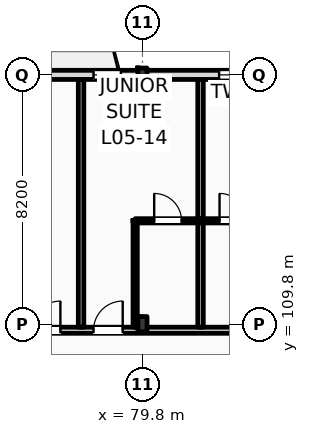
"""IFC4 building model, lengths in metres.
Left out: names, types, materials, properties, quantities, classifications, styles, units other than length and angle.
Written with IfcOpenShell. Run it as: python <this file> out.ifc"""

import sys

from ifc_helpers import new_model, si_unit, direction, frame, frame_2d, origin, origin_2d, place, context, subcontext, project, spatial, rectangle, i_section, extrude, element, fill, save


model = new_model("IFC4")
c1 = context("Model", 3, precision=1e-05, world=origin(), true_north=direction((0.0, 1.0)))
c2 = subcontext(c1, "Body", "Model", "MODEL_VIEW")
j1 = project(units=[si_unit("LENGTHUNIT", "METRE"), si_unit("PLANEANGLEUNIT", "RADIAN")], contexts=[c1])
p1 = place(None, origin())
s1 = spatial("IfcSite", under=j1, at=p1, CompositionType="ELEMENT")
p2 = place(p1, origin())
s2 = spatial("IfcBuilding", under=s1, at=p2, CompositionType="ELEMENT")
p3 = place(p2, frame((0.0, 0.0, 24.6)))
s3 = spatial("IfcBuildingStorey", under=s2, at=p3, CompositionType="ELEMENT", Elevation=24.6)
p4 = place(p3, frame((79.8, 109.8, 0.0), z_axis=(0.0, 0.0, 1.0), x_axis=(1.0, 0.0, 0.0)))
e1 = element("IfcColumn", 1, at=p4, inside=s3, PredefinedType="COLUMN", context=c2, shape_type="SweptSolid", body=[
    extrude(i_section(OverallWidth=0.3, OverallDepth=0.5, WebThickness=0.014, FlangeThickness=0.028, FilletRadius=0.027, at=origin_2d()), origin(), (0.0, 0.0, 1.0), 3.6),
])
p5 = place(p3, frame((79.8, 118.0, 0.0), z_axis=(0.0, 0.0, 1.0), x_axis=(1.0, 0.0, 0.0)))
e2 = element("IfcColumn", 2, at=p5, inside=s3, PredefinedType="COLUMN", context=c2, shape_type="SweptSolid", body=[
    extrude(i_section(OverallWidth=0.3, OverallDepth=0.45, WebThickness=0.014, FlangeThickness=0.026, FilletRadius=0.027, at=origin_2d()), origin(), (0.0, 0.0, 1.0), 3.6),
])
p6 = place(p3, frame((22.5, 118.0, 0.0), z_axis=(0.0, 0.0, 1.0), x_axis=(1.0, 0.0, 0.0)))
e3 = element("IfcWall", 3, at=p6, inside=s3, PredefinedType="STANDARD", context=c2, shape_type="SweptSolid", body=[
    extrude(rectangle(XDim=97.5, YDim=0.3, at=frame_2d((48.75, 0.0))), origin(), (0.0, 0.0, 1.0), 2.78),
])
p7 = place(p6, frame((0.91, 0.0, 0.9)))
e4 = element("IfcOpeningElement", 4, at=p7, cuts=e3, PredefinedType="OPENING", context=c2, shape_type="SweptSolid", body=[
    extrude(rectangle(XDim=0.9, YDim=1.7, at=frame_2d((0.45, 0.85))), frame((0.0, 0.16, 0.0), z_axis=(0.0, -1.0, 0.0), x_axis=(1.0, 0.0, 0.0)), (0.0, 0.0, 1.0), 0.32),
])
p8 = place(p6, frame((6.275, 0.0, 0.0)))
e5 = element("IfcOpeningElement", 5, at=p8, cuts=e3, PredefinedType="OPENING", context=c2, shape_type="SweptSolid", body=[
    extrude(rectangle(XDim=1.2, YDim=2.25, at=frame_2d((0.6, 1.125))), frame((0.0, 0.16, 0.0), z_axis=(0.0, -1.0, 0.0), x_axis=(1.0, 0.0, 0.0)), (0.0, 0.0, 1.0), 0.32),
])
p9 = place(p6, frame((11.42, 0.0, 0.9)))
e6 = element("IfcOpeningElement", 6, at=p9, cuts=e3, PredefinedType="OPENING", context=c2, shape_type="SweptSolid", body=[
    extrude(rectangle(XDim=1.35, YDim=1.7, at=frame_2d((0.675, 0.85))), frame((0.0, 0.16, 0.0), z_axis=(0.0, -1.0, 0.0), x_axis=(1.0, 0.0, 0.0)), (0.0, 0.0, 1.0), 0.32),
])
p10 = place(p6, frame((14.345, 0.0, 0.9)))
e7 = element("IfcOpeningElement", 7, at=p10, cuts=e3, PredefinedType="OPENING", context=c2, shape_type="SweptSolid", body=[
    extrude(rectangle(XDim=1.8, YDim=1.7, at=frame_2d((0.9, 0.85))), frame((0.0, 0.16, 0.0), z_axis=(0.0, -1.0, 0.0), x_axis=(1.0, 0.0, 0.0)), (0.0, 0.0, 1.0), 0.32),
])
p11 = place(p6, frame((19.27, 0.0, 0.9)))
e8 = element("IfcOpeningElement", 8, at=p11, cuts=e3, PredefinedType="OPENING", context=c2, shape_type="SweptSolid", body=[
    extrude(rectangle(XDim=1.95, YDim=1.7, at=frame_2d((0.975, 0.85))), frame((0.0, 0.16, 0.0), z_axis=(0.0, -1.0, 0.0), x_axis=(1.0, 0.0, 0.0)), (0.0, 0.0, 1.0), 0.32),
])
p12 = place(p6, frame((22.97, 0.0, 0.0)))
e9 = element("IfcOpeningElement", 9, at=p12, cuts=e3, PredefinedType="OPENING", context=c2, shape_type="SweptSolid", body=[
    extrude(rectangle(XDim=1.2, YDim=2.25, at=frame_2d((0.6, 1.125))), frame((0.0, 0.16, 0.0), z_axis=(0.0, -1.0, 0.0), x_axis=(1.0, 0.0, 0.0)), (0.0, 0.0, 1.0), 0.32),
])
p13 = place(p6, frame((26.92, 0.0, 0.9)))
e10 = element("IfcOpeningElement", 10, at=p13, cuts=e3, PredefinedType="OPENING", context=c2, shape_type="SweptSolid", body=[
    extrude(rectangle(XDim=2.25, YDim=1.7, at=frame_2d((1.125, 0.85))), frame((0.0, 0.16, 0.0), z_axis=(0.0, -1.0, 0.0), x_axis=(1.0, 0.0, 0.0)), (0.0, 0.0, 1.0), 0.32),
])
p14 = place(p6, frame((30.645, 0.0, 0.9)))
e11 = element("IfcOpeningElement", 11, at=p14, cuts=e3, PredefinedType="OPENING", context=c2, shape_type="SweptSolid", body=[
    extrude(rectangle(XDim=2.4, YDim=1.7, at=frame_2d((1.2, 0.85))), frame((0.0, 0.16, 0.0), z_axis=(0.0, -1.0, 0.0), x_axis=(1.0, 0.0, 0.0)), (0.0, 0.0, 1.0), 0.32),
])
p15 = place(p6, frame((36.71, 0.0, 0.0)))
e12 = element("IfcOpeningElement", 12, at=p15, cuts=e3, PredefinedType="OPENING", context=c2, shape_type="SweptSolid", body=[
    extrude(rectangle(XDim=1.2, YDim=2.25, at=frame_2d((0.6, 1.125))), frame((0.0, 0.16, 0.0), z_axis=(0.0, -1.0, 0.0), x_axis=(1.0, 0.0, 0.0)), (0.0, 0.0, 1.0), 0.32),
])
p16 = place(p6, frame((39.17, 0.0, 0.0)))
e13 = element("IfcOpeningElement", 13, at=p16, cuts=e3, PredefinedType="OPENING", context=c2, shape_type="SweptSolid", body=[
    extrude(rectangle(XDim=1.2, YDim=2.25, at=frame_2d((0.6, 1.125))), frame((0.0, 0.16, 0.0), z_axis=(0.0, -1.0, 0.0), x_axis=(1.0, 0.0, 0.0)), (0.0, 0.0, 1.0), 0.32),
])
p17 = place(p6, frame((43.22, 0.0, 0.9)))
e14 = element("IfcOpeningElement", 14, at=p17, cuts=e3, PredefinedType="OPENING", context=c2, shape_type="SweptSolid", body=[
    extrude(rectangle(XDim=2.85, YDim=1.7, at=frame_2d((1.425, 0.85))), frame((0.0, 0.16, 0.0), z_axis=(0.0, -1.0, 0.0), x_axis=(1.0, 0.0, 0.0)), (0.0, 0.0, 1.0), 0.32),
])
p18 = place(p6, frame((47.29, 0.0, 0.9)))
e15 = element("IfcOpeningElement", 15, at=p18, cuts=e3, PredefinedType="OPENING", context=c2, shape_type="SweptSolid", body=[
    extrude(rectangle(XDim=1.35, YDim=1.7, at=frame_2d((0.675, 0.85))), frame((0.0, 0.16, 0.0), z_axis=(0.0, -1.0, 0.0), x_axis=(1.0, 0.0, 0.0)), (0.0, 0.0, 1.0), 0.32),
])
p19 = place(p6, frame((52.91, 0.0, 0.0)))
e16 = element("IfcOpeningElement", 16, at=p19, cuts=e3, PredefinedType="OPENING", context=c2, shape_type="SweptSolid", body=[
    extrude(rectangle(XDim=1.2, YDim=2.25, at=frame_2d((0.6, 1.125))), frame((0.0, 0.16, 0.0), z_axis=(0.0, -1.0, 0.0), x_axis=(1.0, 0.0, 0.0)), (0.0, 0.0, 1.0), 0.32),
])
p20 = place(p6, frame((55.69, 0.0, 0.9)))
e17 = element("IfcOpeningElement", 17, at=p20, cuts=e3, PredefinedType="OPENING", context=c2, shape_type="SweptSolid", body=[
    extrude(rectangle(XDim=0.9, YDim=1.7, at=frame_2d((0.45, 0.85))), frame((0.0, 0.16, 0.0), z_axis=(0.0, -1.0, 0.0), x_axis=(1.0, 0.0, 0.0)), (0.0, 0.0, 1.0), 0.32),
])
p21 = place(p6, frame((59.82, 0.0, 0.9)))
e18 = element("IfcOpeningElement", 18, at=p21, cuts=e3, PredefinedType="OPENING", context=c2, shape_type="SweptSolid", body=[
    extrude(rectangle(XDim=3.25, YDim=1.7, at=frame_2d((1.625, 0.85))), frame((0.0, 0.16, 0.0), z_axis=(0.0, -1.0, 0.0), x_axis=(1.0, 0.0, 0.0)), (0.0, 0.0, 1.0), 0.32),
])
p22 = place(p6, frame((65.89, 0.0, 0.9)))
e19 = element("IfcOpeningElement", 19, at=p22, cuts=e3, PredefinedType="OPENING", context=c2, shape_type="SweptSolid", body=[
    extrude(rectangle(XDim=1.1, YDim=1.7, at=frame_2d((0.55, 0.85))), frame((0.0, 0.16, 0.0), z_axis=(0.0, -1.0, 0.0), x_axis=(1.0, 0.0, 0.0)), (0.0, 0.0, 1.0), 0.32),
])
p23 = place(p6, frame((69.245, 0.0, 0.0)))
e20 = element("IfcOpeningElement", 20, at=p23, cuts=e3, PredefinedType="OPENING", context=c2, shape_type="SweptSolid", body=[
    extrude(rectangle(XDim=1.2, YDim=2.25, at=frame_2d((0.6, 1.125))), frame((0.0, 0.16, 0.0), z_axis=(0.0, -1.0, 0.0), x_axis=(1.0, 0.0, 0.0)), (0.0, 0.0, 1.0), 0.32),
])
p24 = place(p6, frame((73.69, 0.0, 0.9)))
e21 = element("IfcOpeningElement", 21, at=p24, cuts=e3, PredefinedType="OPENING", context=c2, shape_type="SweptSolid", body=[
    extrude(rectangle(XDim=1.8, YDim=1.7, at=frame_2d((0.9, 0.85))), frame((0.0, 0.16, 0.0), z_axis=(0.0, -1.0, 0.0), x_axis=(1.0, 0.0, 0.0)), (0.0, 0.0, 1.0), 0.32),
])
p25 = place(p6, frame((76.62, 0.0, 0.9)))
e22 = element("IfcOpeningElement", 22, at=p25, cuts=e3, PredefinedType="OPENING", context=c2, shape_type="SweptSolid", body=[
    extrude(rectangle(XDim=3.25, YDim=1.7, at=frame_2d((1.625, 0.85))), frame((0.0, 0.16, 0.0), z_axis=(0.0, -1.0, 0.0), x_axis=(1.0, 0.0, 0.0)), (0.0, 0.0, 1.0), 0.32),
])
p26 = place(p6, frame((81.895, 0.0, 0.9)))
e23 = element("IfcOpeningElement", 23, at=p26, cuts=e3, PredefinedType="OPENING", context=c2, shape_type="SweptSolid", body=[
    extrude(rectangle(XDim=1.1, YDim=1.5, at=frame_2d((0.55, 0.75))), frame((0.0, 0.16, 0.0), z_axis=(0.0, -1.0, 0.0), x_axis=(1.0, 0.0, 0.0)), (0.0, 0.0, 1.0), 0.32),
])
p27 = place(p6, frame((86.02, 0.0, 0.9)))
e24 = element("IfcOpeningElement", 24, at=p27, cuts=e3, PredefinedType="OPENING", context=c2, shape_type="SweptSolid", body=[
    extrude(rectangle(XDim=1.25, YDim=1.6, at=frame_2d((0.625, 0.8))), frame((0.0, 0.16, 0.0), z_axis=(0.0, -1.0, 0.0), x_axis=(1.0, 0.0, 0.0)), (0.0, 0.0, 1.0), 0.32),
])
p28 = place(p6, frame((90.145, 0.0, 0.9)))
e25 = element("IfcOpeningElement", 25, at=p28, cuts=e3, PredefinedType="OPENING", context=c2, shape_type="SweptSolid", body=[
    extrude(rectangle(XDim=1.4, YDim=1.7, at=frame_2d((0.7, 0.85))), frame((0.0, 0.16, 0.0), z_axis=(0.0, -1.0, 0.0), x_axis=(1.0, 0.0, 0.0)), (0.0, 0.0, 1.0), 0.32),
])
p29 = place(p6, frame((94.155, 0.0, 0.9)))
e26 = element("IfcOpeningElement", 26, at=p29, cuts=e3, PredefinedType="OPENING", context=c2, shape_type="SweptSolid", body=[
    extrude(rectangle(XDim=1.6, YDim=1.7, at=frame_2d((0.8, 0.85))), frame((0.0, 0.16, 0.0), z_axis=(0.0, -1.0, 0.0), x_axis=(1.0, 0.0, 0.0)), (0.0, 0.0, 1.0), 0.32),
])
p30 = place(p3, frame((10.65, 109.6, 0.0), z_axis=(0.0, 0.0, 1.0), x_axis=(1.0, 0.0, 0.0)))
e27 = element("IfcWall", 27, at=p30, inside=s3, PredefinedType="PARTITIONING", context=c2, shape_type="SweptSolid", body=[
    extrude(rectangle(XDim=109.21, YDim=0.2, at=frame_2d((54.605, 0.0))), origin(), (0.0, 0.0, 1.0), 2.78),
])
p31 = place(p30, frame((12.705, 0.0, 0.0)))
e28 = element("IfcOpeningElement", 28, at=p31, cuts=e27, PredefinedType="OPENING", context=c2, shape_type="SweptSolid", body=[
    extrude(rectangle(XDim=1.02, YDim=2.2, at=frame_2d((0.51, 1.1))), frame((0.0, 0.11, 0.0), z_axis=(0.0, -1.0, 0.0), x_axis=(1.0, 0.0, 0.0)), (0.0, 0.0, 1.0), 0.22),
])
p32 = place(p30, frame((19.26, 0.0, 0.0)))
e29 = element("IfcOpeningElement", 29, at=p32, cuts=e27, PredefinedType="OPENING", context=c2, shape_type="SweptSolid", body=[
    extrude(rectangle(XDim=1.02, YDim=2.2, at=frame_2d((0.51, 1.1))), frame((0.0, 0.11, 0.0), z_axis=(0.0, -1.0, 0.0), x_axis=(1.0, 0.0, 0.0)), (0.0, 0.0, 1.0), 0.22),
])
p33 = place(p30, frame((23.71, 0.0, 0.0)))
e30 = element("IfcOpeningElement", 30, at=p33, cuts=e27, PredefinedType="OPENING", context=c2, shape_type="SweptSolid", body=[
    extrude(rectangle(XDim=1.02, YDim=2.2, at=frame_2d((0.51, 1.1))), frame((0.0, 0.11, 0.0), z_axis=(0.0, -1.0, 0.0), x_axis=(1.0, 0.0, 0.0)), (0.0, 0.0, 1.0), 0.22),
])
p34 = place(p30, frame((27.66, 0.0, 0.0)))
e31 = element("IfcOpeningElement", 31, at=p34, cuts=e27, PredefinedType="OPENING", context=c2, shape_type="SweptSolid", body=[
    extrude(rectangle(XDim=1.02, YDim=2.2, at=frame_2d((0.51, 1.1))), frame((0.0, 0.11, 0.0), z_axis=(0.0, -1.0, 0.0), x_axis=(1.0, 0.0, 0.0)), (0.0, 0.0, 1.0), 0.22),
])
p35 = place(p30, frame((31.89, 0.0, 0.0)))
e32 = element("IfcOpeningElement", 32, at=p35, cuts=e27, PredefinedType="OPENING", context=c2, shape_type="SweptSolid", body=[
    extrude(rectangle(XDim=0.96, YDim=2.2, at=frame_2d((0.48, 1.1))), frame((0.0, 0.11, 0.0), z_axis=(0.0, -1.0, 0.0), x_axis=(1.0, 0.0, 0.0)), (0.0, 0.0, 1.0), 0.22),
])
p36 = place(p30, frame((33.94, 0.0, 0.0)))
e33 = element("IfcOpeningElement", 33, at=p36, cuts=e27, PredefinedType="OPENING", context=c2, shape_type="SweptSolid", body=[
    extrude(rectangle(XDim=0.96, YDim=2.2, at=frame_2d((0.48, 1.1))), frame((0.0, 0.11, 0.0), z_axis=(0.0, -1.0, 0.0), x_axis=(1.0, 0.0, 0.0)), (0.0, 0.0, 1.0), 0.22),
])
p37 = place(p30, frame((40.29, 0.0, 0.0)))
e34 = element("IfcOpeningElement", 34, at=p37, cuts=e27, PredefinedType="OPENING", context=c2, shape_type="SweptSolid", body=[
    extrude(rectangle(XDim=0.96, YDim=2.2, at=frame_2d((0.48, 1.1))), frame((0.0, 0.11, 0.0), z_axis=(0.0, -1.0, 0.0), x_axis=(1.0, 0.0, 0.0)), (0.0, 0.0, 1.0), 0.22),
])
p38 = place(p30, frame((42.34, 0.0, 0.0)))
e35 = element("IfcOpeningElement", 35, at=p38, cuts=e27, PredefinedType="OPENING", context=c2, shape_type="SweptSolid", body=[
    extrude(rectangle(XDim=0.96, YDim=2.2, at=frame_2d((0.48, 1.1))), frame((0.0, 0.11, 0.0), z_axis=(0.0, -1.0, 0.0), x_axis=(1.0, 0.0, 0.0)), (0.0, 0.0, 1.0), 0.22),
])
p39 = place(p30, frame((48.69, 0.0, 0.0)))
e36 = element("IfcOpeningElement", 36, at=p39, cuts=e27, PredefinedType="OPENING", context=c2, shape_type="SweptSolid", body=[
    extrude(rectangle(XDim=0.96, YDim=2.2, at=frame_2d((0.48, 1.1))), frame((0.0, 0.11, 0.0), z_axis=(0.0, -1.0, 0.0), x_axis=(1.0, 0.0, 0.0)), (0.0, 0.0, 1.0), 0.22),
])
p40 = place(p30, frame((50.74, 0.0, 0.0)))
e37 = element("IfcOpeningElement", 37, at=p40, cuts=e27, PredefinedType="OPENING", context=c2, shape_type="SweptSolid", body=[
    extrude(rectangle(XDim=0.96, YDim=2.2, at=frame_2d((0.48, 1.1))), frame((0.0, 0.11, 0.0), z_axis=(0.0, -1.0, 0.0), x_axis=(1.0, 0.0, 0.0)), (0.0, 0.0, 1.0), 0.22),
])
p41 = place(p30, frame((57.09, 0.0, 0.0)))
e38 = element("IfcOpeningElement", 38, at=p41, cuts=e27, PredefinedType="OPENING", context=c2, shape_type="SweptSolid", body=[
    extrude(rectangle(XDim=0.96, YDim=2.2, at=frame_2d((0.48, 1.1))), frame((0.0, 0.11, 0.0), z_axis=(0.0, -1.0, 0.0), x_axis=(1.0, 0.0, 0.0)), (0.0, 0.0, 1.0), 0.22),
])
p42 = place(p30, frame((59.14, 0.0, 0.0)))
e39 = element("IfcOpeningElement", 39, at=p42, cuts=e27, PredefinedType="OPENING", context=c2, shape_type="SweptSolid", body=[
    extrude(rectangle(XDim=0.96, YDim=2.2, at=frame_2d((0.48, 1.1))), frame((0.0, 0.11, 0.0), z_axis=(0.0, -1.0, 0.0), x_axis=(1.0, 0.0, 0.0)), (0.0, 0.0, 1.0), 0.22),
])
p43 = place(p30, frame((65.49, 0.0, 0.0)))
e40 = element("IfcOpeningElement", 40, at=p43, cuts=e27, PredefinedType="OPENING", context=c2, shape_type="SweptSolid", body=[
    extrude(rectangle(XDim=0.96, YDim=2.2, at=frame_2d((0.48, 1.1))), frame((0.0, 0.11, 0.0), z_axis=(0.0, -1.0, 0.0), x_axis=(1.0, 0.0, 0.0)), (0.0, 0.0, 1.0), 0.22),
])
p44 = place(p30, frame((67.54, 0.0, 0.0)))
e41 = element("IfcOpeningElement", 41, at=p44, cuts=e27, PredefinedType="OPENING", context=c2, shape_type="SweptSolid", body=[
    extrude(rectangle(XDim=0.96, YDim=2.2, at=frame_2d((0.48, 1.1))), frame((0.0, 0.11, 0.0), z_axis=(0.0, -1.0, 0.0), x_axis=(1.0, 0.0, 0.0)), (0.0, 0.0, 1.0), 0.22),
])
p45 = place(p30, frame((73.89, 0.0, 0.0)))
e42 = element("IfcOpeningElement", 42, at=p45, cuts=e27, PredefinedType="OPENING", context=c2, shape_type="SweptSolid", body=[
    extrude(rectangle(XDim=0.96, YDim=2.2, at=frame_2d((0.48, 1.1))), frame((0.0, 0.11, 0.0), z_axis=(0.0, -1.0, 0.0), x_axis=(1.0, 0.0, 0.0)), (0.0, 0.0, 1.0), 0.22),
])
p46 = place(p30, frame((78.09, 0.0, 0.0)))
e43 = element("IfcOpeningElement", 43, at=p46, cuts=e27, PredefinedType="OPENING", context=c2, shape_type="SweptSolid", body=[
    extrude(rectangle(XDim=0.96, YDim=2.2, at=frame_2d((0.48, 1.1))), frame((0.0, 0.11, 0.0), z_axis=(0.0, -1.0, 0.0), x_axis=(1.0, 0.0, 0.0)), (0.0, 0.0, 1.0), 0.22),
])
p47 = place(p30, frame((82.29, 0.0, 0.0)))
e44 = element("IfcOpeningElement", 44, at=p47, cuts=e27, PredefinedType="OPENING", context=c2, shape_type="SweptSolid", body=[
    extrude(rectangle(XDim=0.96, YDim=2.2, at=frame_2d((0.48, 1.1))), frame((0.0, 0.11, 0.0), z_axis=(0.0, -1.0, 0.0), x_axis=(1.0, 0.0, 0.0)), (0.0, 0.0, 1.0), 0.22),
])
p48 = place(p30, frame((86.49, 0.0, 0.0)))
e45 = element("IfcOpeningElement", 45, at=p48, cuts=e27, PredefinedType="OPENING", context=c2, shape_type="SweptSolid", body=[
    extrude(rectangle(XDim=0.96, YDim=2.2, at=frame_2d((0.48, 1.1))), frame((0.0, 0.11, 0.0), z_axis=(0.0, -1.0, 0.0), x_axis=(1.0, 0.0, 0.0)), (0.0, 0.0, 1.0), 0.22),
])
p49 = place(p30, frame((88.54, 0.0, 0.0)))
e46 = element("IfcOpeningElement", 46, at=p49, cuts=e27, PredefinedType="OPENING", context=c2, shape_type="SweptSolid", body=[
    extrude(rectangle(XDim=0.96, YDim=2.2, at=frame_2d((0.48, 1.1))), frame((0.0, 0.11, 0.0), z_axis=(0.0, -1.0, 0.0), x_axis=(1.0, 0.0, 0.0)), (0.0, 0.0, 1.0), 0.22),
])
p50 = place(p30, frame((94.89, 0.0, 0.0)))
e47 = element("IfcOpeningElement", 47, at=p50, cuts=e27, PredefinedType="OPENING", context=c2, shape_type="SweptSolid", body=[
    extrude(rectangle(XDim=0.96, YDim=2.2, at=frame_2d((0.48, 1.1))), frame((0.0, 0.11, 0.0), z_axis=(0.0, -1.0, 0.0), x_axis=(1.0, 0.0, 0.0)), (0.0, 0.0, 1.0), 0.22),
])
p51 = place(p30, frame((96.94, 0.0, 0.0)))
e48 = element("IfcOpeningElement", 48, at=p51, cuts=e27, PredefinedType="OPENING", context=c2, shape_type="SweptSolid", body=[
    extrude(rectangle(XDim=0.96, YDim=2.2, at=frame_2d((0.48, 1.1))), frame((0.0, 0.11, 0.0), z_axis=(0.0, -1.0, 0.0), x_axis=(1.0, 0.0, 0.0)), (0.0, 0.0, 1.0), 0.22),
])
p52 = place(p30, frame((103.29, 0.0, 0.0)))
e49 = element("IfcOpeningElement", 49, at=p52, cuts=e27, PredefinedType="OPENING", context=c2, shape_type="SweptSolid", body=[
    extrude(rectangle(XDim=0.96, YDim=2.2, at=frame_2d((0.48, 1.1))), frame((0.0, 0.11, 0.0), z_axis=(0.0, -1.0, 0.0), x_axis=(1.0, 0.0, 0.0)), (0.0, 0.0, 1.0), 0.22),
])
p53 = place(p30, frame((105.25, 0.0, 0.0)))
e50 = element("IfcOpeningElement", 50, at=p53, cuts=e27, PredefinedType="OPENING", context=c2, shape_type="SweptSolid", body=[
    extrude(rectangle(XDim=0.96, YDim=2.2, at=frame_2d((0.48, 1.1))), frame((0.0, 0.11, 0.0), z_axis=(0.0, -1.0, 0.0), x_axis=(1.0, 0.0, 0.0)), (0.0, 0.0, 1.0), 0.22),
])
p54 = place(p30, frame((2.716, 0.0, 0.0)))
e51 = element("IfcOpeningElement", 51, at=p54, cuts=e27, PredefinedType="OPENING", context=c2, shape_type="SweptSolid", body=[
    extrude(rectangle(XDim=1.35, YDim=2.25, at=frame_2d((0.675, 1.125))), frame((0.0, 0.11, 0.0), z_axis=(0.0, -1.0, 0.0), x_axis=(1.0, 0.0, 0.0)), (0.0, 0.0, 1.0), 0.22),
])
p55 = place(p30, frame((6.65, 0.0, 0.0)))
e52 = element("IfcOpeningElement", 52, at=p55, cuts=e27, PredefinedType="OPENING", context=c2, shape_type="SweptSolid", body=[
    extrude(rectangle(XDim=1.35, YDim=2.25, at=frame_2d((0.675, 1.125))), frame((0.0, 0.11, 0.0), z_axis=(0.0, -1.0, 0.0), x_axis=(1.0, 0.0, 0.0)), (0.0, 0.0, 1.0), 0.22),
])
p56 = place(p30, frame((10.583, 0.0, 0.0)))
e53 = element("IfcOpeningElement", 53, at=p56, cuts=e27, PredefinedType="OPENING", context=c2, shape_type="SweptSolid", body=[
    extrude(rectangle(XDim=1.35, YDim=2.25, at=frame_2d((0.675, 1.125))), frame((0.0, 0.11, 0.0), z_axis=(0.0, -1.0, 0.0), x_axis=(1.0, 0.0, 0.0)), (0.0, 0.0, 1.0), 0.22),
])
for number, where, z_axis, x_axis in (
    (54, (77.78, 109.7, 0.0), (0.0, 0.0, 1.0), (0.0, 1.0, 0.0)),
    (55, (81.71, 109.7, 0.0), (0.0, 0.0, 1.0), (0.0, 1.0, 0.0)),
):
    element("IfcWall", number, at=place(p3, frame(where, z_axis=z_axis, x_axis=x_axis)), inside=s3, PredefinedType="PARTITIONING", context=c2, shape_type="SweptSolid", body=[
        extrude(rectangle(XDim=8.15, YDim=0.18, at=frame_2d((4.075, 0.0))), origin(), (0.0, 0.0, 1.0), 3.34),
    ])
p57 = place(p3, frame((79.56, 109.7, 0.0), z_axis=(0.0, 0.0, 1.0), x_axis=(0.0, 1.0, 0.0)))
e56 = element("IfcWall", 56, at=p57, inside=s3, PredefinedType="PARTITIONING", context=c2, shape_type="SweptSolid", body=[
    extrude(rectangle(XDim=3.5, YDim=0.14, at=frame_2d((1.75, 0.0))), origin(), (0.0, 0.0, 1.0), 2.93),
])
p58 = place(p3, frame((79.56, 113.2, 0.0), z_axis=(0.0, 0.0, 1.0), x_axis=(1.0, 0.0, 0.0)))
e57 = element("IfcWall", 57, at=p58, inside=s3, PredefinedType="PARTITIONING", context=c2, shape_type="SweptSolid", body=[
    extrude(rectangle(XDim=2.15, YDim=0.14, at=frame_2d((1.075, 0.0))), origin(), (0.0, 0.0, 1.0), 3.34),
])
p59 = place(p58, frame((0.625, 0.0, 0.0)))
e58 = element("IfcOpeningElement", 58, at=p59, cuts=e57, PredefinedType="OPENING", context=c2, shape_type="SweptSolid", body=[
    extrude(rectangle(XDim=0.9, YDim=2.1, at=frame_2d((0.45, 1.05))), frame((0.0, 0.08, 0.0), z_axis=(0.0, -1.0, 0.0), x_axis=(1.0, 0.0, 0.0)), (0.0, 0.0, 1.0), 0.16),
])
p60 = place(p3, frame((81.71, 113.2, 0.0), z_axis=(0.0, 0.0, 1.0), x_axis=(1.0, 0.0, 0.0)))
e59 = element("IfcWall", 59, at=p60, inside=s3, PredefinedType="PARTITIONING", context=c2, shape_type="SweptSolid", body=[
    extrude(rectangle(XDim=2.15, YDim=0.14, at=frame_2d((1.075, 0.0))), origin(), (0.0, 0.0, 1.0), 3.34),
])
p61 = place(p60, frame((0.625, 0.0, 0.0)))
e60 = element("IfcOpeningElement", 60, at=p61, cuts=e59, PredefinedType="OPENING", context=c2, shape_type="SweptSolid", body=[
    extrude(rectangle(XDim=0.9, YDim=2.1, at=frame_2d((0.45, 1.05))), frame((0.0, 0.08, 0.0), z_axis=(0.0, -1.0, 0.0), x_axis=(1.0, 0.0, 0.0)), (0.0, 0.0, 1.0), 0.16),
])
p62 = place(p20, origin())
e61 = element("IfcWindow", 61, at=p62, inside=s3, PartitioningType="DOUBLE_PANEL_VERTICAL", PredefinedType="WINDOW", context=c2, shape_type="SweptSolid", body=[
    extrude(rectangle(XDim=0.9, YDim=1.7, at=frame_2d((0.45, 0.85))), frame((0.0, 0.03, 0.0), z_axis=(0.0, -1.0, 0.0), x_axis=(1.0, 0.0, 0.0)), (0.0, 0.0, 1.0), 0.06),
])
fill(e17, e61)
p63 = place(p21, origin())
e62 = element("IfcWindow", 62, at=p63, inside=s3, PartitioningType="DOUBLE_PANEL_VERTICAL", PredefinedType="WINDOW", context=c2, shape_type="SweptSolid", body=[
    extrude(rectangle(XDim=3.25, YDim=1.7, at=frame_2d((1.625, 0.85))), frame((0.0, 0.03, 0.0), z_axis=(0.0, -1.0, 0.0), x_axis=(1.0, 0.0, 0.0)), (0.0, 0.0, 1.0), 0.06),
])
fill(e18, e62)
p64 = place(p43, origin())
e63 = element("IfcDoor", 63, at=p64, inside=s3, OperationType="SINGLE_SWING_RIGHT", PredefinedType="DOOR", context=c2, shape_type="SweptSolid", body=[
    extrude(rectangle(XDim=0.96, YDim=2.2, at=frame_2d((0.48, 1.1))), frame((0.0, 0.025, 0.0), z_axis=(0.0, -1.0, 0.0), x_axis=(1.0, 0.0, 0.0)), (0.0, 0.0, 1.0), 0.05),
])
fill(e40, e63)
p65 = place(p44, origin())
e64 = element("IfcDoor", 64, at=p65, inside=s3, OperationType="SINGLE_SWING_RIGHT", PredefinedType="DOOR", context=c2, shape_type="SweptSolid", body=[
    extrude(rectangle(XDim=0.96, YDim=2.2, at=frame_2d((0.48, 1.1))), frame((0.0, 0.025, 0.0), z_axis=(0.0, -1.0, 0.0), x_axis=(1.0, 0.0, 0.0)), (0.0, 0.0, 1.0), 0.05),
])
fill(e41, e64)
p66 = place(p59, origin())
e65 = element("IfcDoor", 65, at=p66, inside=s3, OperationType="SINGLE_SWING_LEFT", PredefinedType="DOOR", context=c2, shape_type="SweptSolid", body=[
    extrude(rectangle(XDim=0.9, YDim=2.1, at=frame_2d((0.45, 1.05))), frame((0.0, 0.025, 0.0), z_axis=(0.0, -1.0, 0.0), x_axis=(1.0, 0.0, 0.0)), (0.0, 0.0, 1.0), 0.05),
])
fill(e58, e65)
p67 = place(p61, origin())
e66 = element("IfcDoor", 66, at=p67, inside=s3, OperationType="SINGLE_SWING_LEFT", PredefinedType="DOOR", context=c2, shape_type="SweptSolid", body=[
    extrude(rectangle(XDim=0.9, YDim=2.1, at=frame_2d((0.45, 1.05))), frame((0.0, 0.025, 0.0), z_axis=(0.0, -1.0, 0.0), x_axis=(1.0, 0.0, 0.0)), (0.0, 0.0, 1.0), 0.05),
])
fill(e60, e66)
save(model, sys.argv[1])
